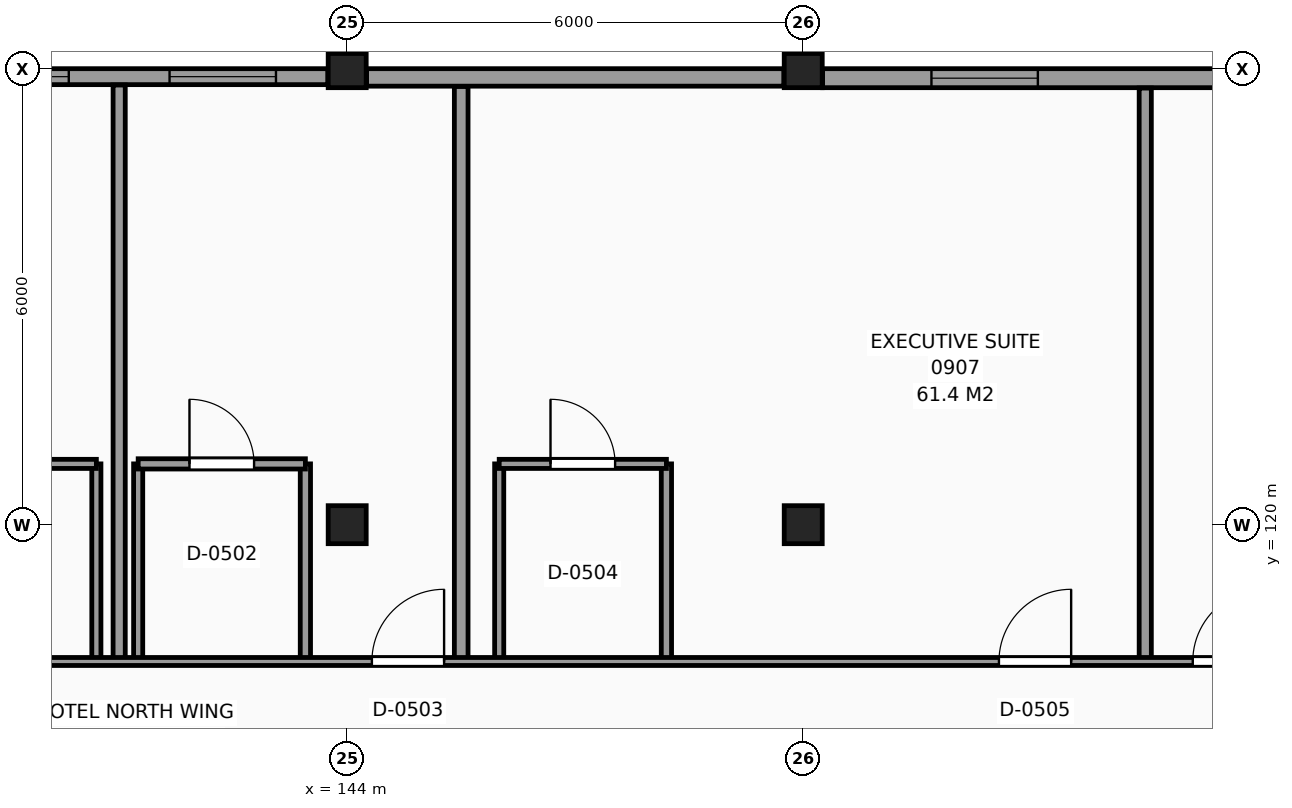
"""IFC4 building model, lengths in metres.
Left out: names, types, materials, properties, quantities, classifications, styles, units other than length and angle.
Written with IfcOpenShell. Run it as: python <this file> out.ifc"""

import sys

from ifc_helpers import new_model, si_unit, direction, frame, frame_2d, origin, origin_2d, place, context, subcontext, project, spatial, rectangle, extrude, element, fill, save


model = new_model("IFC4")
c1 = context("Model", 3, precision=1e-05, world=origin(), true_north=direction((0.0, 1.0)))
c2 = subcontext(c1, "Body", "Model", "MODEL_VIEW")
j1 = project(units=[si_unit("LENGTHUNIT", "METRE"), si_unit("PLANEANGLEUNIT", "RADIAN")], contexts=[c1])
p1 = place(None, origin())
s1 = spatial("IfcSite", under=j1, at=p1, CompositionType="ELEMENT")
p2 = place(p1, origin())
s2 = spatial("IfcBuilding", under=s1, at=p2, CompositionType="ELEMENT")
p3 = place(p2, frame((0.0, 0.0, 38.1)))
s3 = spatial("IfcBuildingStorey", under=s2, at=p3, CompositionType="ELEMENT", Elevation=38.1)
for number, where, z_axis, x_axis in (
    (1, (144.0, 120.0, 0.0), (0.0, 0.0, 1.0), (1.0, 0.0, 0.0)),
    (2, (144.0, 126.0, 0.0), (0.0, 0.0, 1.0), (1.0, 0.0, 0.0)),
    (3, (150.0, 120.0, 0.0), (0.0, 0.0, 1.0), (1.0, 0.0, 0.0)),
    (4, (150.0, 126.0, 0.0), (0.0, 0.0, 1.0), (1.0, 0.0, 0.0)),
):
    element("IfcColumn", number, at=place(p3, frame(where, z_axis=z_axis, x_axis=x_axis)), inside=s3, PredefinedType="COLUMN", context=c2, shape_type="SweptSolid", body=[
        extrude(rectangle(XDim=0.5, YDim=0.5, at=origin_2d()), origin(), (0.0, 0.0, 1.0), 3.3),
    ])
p4 = place(p3, frame((155.745, 125.875, 0.0), z_axis=(0.0, 0.0, 1.0), x_axis=(-1.0, 0.0, 0.0)))
e5 = element("IfcWall", 5, at=p4, inside=s3, PredefinedType="SOLIDWALL", context=c2, shape_type="SweptSolid", body=[
    extrude(rectangle(XDim=5.49, YDim=0.25, at=frame_2d((2.745, 0.0))), origin(), (0.0, 0.0, 1.0), 2.41),
])
p5 = place(p4, frame((2.658, 0.0, 0.8)))
e6 = element("IfcOpeningElement", 6, at=p5, cuts=e5, PredefinedType="OPENING", context=c2, shape_type="SweptSolid", body=[
    extrude(rectangle(XDim=1.4, YDim=1.4, at=frame_2d((0.7, 0.7))), frame((0.0, 0.135, 0.0), z_axis=(0.0, -1.0, 0.0), x_axis=(1.0, 0.0, 0.0)), (0.0, 0.0, 1.0), 0.27),
])
p6 = place(p3, frame((149.745, 125.885, 0.0), z_axis=(0.0, 0.0, 1.0), x_axis=(-1.0, 0.0, 0.0)))
e7 = element("IfcWall", 7, at=p6, inside=s3, PredefinedType="SOLIDWALL", context=c2, shape_type="SweptSolid", body=[
    extrude(rectangle(XDim=5.49, YDim=0.23, at=frame_2d((2.745, 0.0))), origin(), (0.0, 0.0, 1.0), 2.41),
])
p7 = place(p3, frame((143.745, 125.895, 0.0), z_axis=(0.0, 0.0, 1.0), x_axis=(-1.0, 0.0, 0.0)))
e8 = element("IfcWall", 8, at=p7, inside=s3, PredefinedType="SOLIDWALL", context=c2, shape_type="SweptSolid", body=[
    extrude(rectangle(XDim=5.49, YDim=0.21, at=frame_2d((2.745, 0.0))), origin(), (0.0, 0.0, 1.0), 2.41),
])
p8 = place(p7, frame((3.408, 0.0, 0.8)))
e9 = element("IfcOpeningElement", 9, at=p8, cuts=e8, PredefinedType="OPENING", context=c2, shape_type="SweptSolid", body=[
    extrude(rectangle(XDim=1.4, YDim=1.4, at=frame_2d((0.7, 0.7))), frame((0.0, 0.115, 0.0), z_axis=(0.0, -1.0, 0.0), x_axis=(1.0, 0.0, 0.0)), (0.0, 0.0, 1.0), 0.23),
])
p9 = place(p7, frame((0.682, 0.0, 0.8)))
e10 = element("IfcOpeningElement", 10, at=p9, cuts=e8, PredefinedType="OPENING", context=c2, shape_type="SweptSolid", body=[
    extrude(rectangle(XDim=1.4, YDim=1.4, at=frame_2d((0.7, 0.7))), frame((0.0, 0.115, 0.0), z_axis=(0.0, -1.0, 0.0), x_axis=(1.0, 0.0, 0.0)), (0.0, 0.0, 1.0), 0.23),
])
p10 = place(p3, frame((140.7, 118.2, 0.0), z_axis=(0.0, 0.0, 1.0), x_axis=(0.0, 1.0, 0.0)))
e11 = element("IfcWall", 11, at=p10, inside=s3, PredefinedType="PARTITIONING", context=c2, shape_type="SweptSolid", body=[
    extrude(rectangle(XDim=2.6, YDim=0.12, at=frame_2d((1.3, 0.0))), origin(), (0.0, 0.0, 1.0), 3.06),
])
p11 = place(p3, frame((141.0, 118.2, 0.0), z_axis=(0.0, 0.0, 1.0), x_axis=(0.0, 1.0, 0.0)))
e12 = element("IfcWall", 12, at=p11, inside=s3, PredefinedType="PARTITIONING", context=c2, shape_type="SweptSolid", body=[
    extrude(rectangle(XDim=7.585, YDim=0.16, at=frame_2d((3.792, 0.0))), origin(), (0.0, 0.0, 1.0), 3.06),
])
p12 = place(p3, frame((141.25, 118.2, 0.0), z_axis=(0.0, 0.0, 1.0), x_axis=(0.0, 1.0, 0.0)))
e13 = element("IfcWall", 13, at=p12, inside=s3, PredefinedType="PARTITIONING", context=c2, shape_type="SweptSolid", body=[
    extrude(rectangle(XDim=2.6, YDim=0.12, at=frame_2d((1.3, 0.0))), origin(), (0.0, 0.0, 1.0), 3.06),
])
p13 = place(p3, frame((143.45, 118.2, 0.0), z_axis=(0.0, 0.0, 1.0), x_axis=(0.0, 1.0, 0.0)))
e14 = element("IfcWall", 14, at=p13, inside=s3, PredefinedType="PARTITIONING", context=c2, shape_type="SweptSolid", body=[
    extrude(rectangle(XDim=2.6, YDim=0.135, at=frame_2d((1.3, 0.0))), origin(), (0.0, 0.0, 1.0), 3.06),
])
p14 = place(p3, frame((145.5, 118.2, 0.0), z_axis=(0.0, 0.0, 1.0), x_axis=(0.0, 1.0, 0.0)))
e15 = element("IfcWall", 15, at=p14, inside=s3, PredefinedType="PARTITIONING", context=c2, shape_type="SweptSolid", body=[
    extrude(rectangle(XDim=7.565, YDim=0.18, at=frame_2d((3.782, 0.0))), origin(), (0.0, 0.0, 1.0), 3.06),
])
p15 = place(p3, frame((146.0, 118.2, 0.0), z_axis=(0.0, 0.0, 1.0), x_axis=(0.0, 1.0, 0.0)))
e16 = element("IfcWall", 16, at=p15, inside=s3, PredefinedType="PARTITIONING", context=c2, shape_type="SweptSolid", body=[
    extrude(rectangle(XDim=2.6, YDim=0.12, at=frame_2d((1.3, 0.0))), origin(), (0.0, 0.0, 1.0), 3.06),
])
p16 = place(p3, frame((148.2, 118.2, 0.0), z_axis=(0.0, 0.0, 1.0), x_axis=(0.0, 1.0, 0.0)))
e17 = element("IfcWall", 17, at=p16, inside=s3, PredefinedType="PARTITIONING", context=c2, shape_type="SweptSolid", body=[
    extrude(rectangle(XDim=2.6, YDim=0.135, at=frame_2d((1.3, 0.0))), origin(), (0.0, 0.0, 1.0), 3.06),
])
p17 = place(p3, frame((154.5, 118.2, 0.0), z_axis=(0.0, 0.0, 1.0), x_axis=(0.0, 1.0, 0.0)))
e18 = element("IfcWall", 18, at=p17, inside=s3, PredefinedType="PARTITIONING", context=c2, shape_type="SweptSolid", body=[
    extrude(rectangle(XDim=7.545, YDim=0.16, at=frame_2d((3.772, 0.0))), origin(), (0.0, 0.0, 1.0), 3.06),
])
p18 = place(p3, frame((102.215, 118.2, 0.0), z_axis=(0.0, 0.0, 1.0), x_axis=(1.0, 0.0, 0.0)))
e19 = element("IfcWall", 19, at=p18, inside=s3, PredefinedType="PARTITIONING", context=c2, shape_type="SweptSolid", body=[
    extrude(rectangle(XDim=74.285, YDim=0.105, at=frame_2d((37.143, 0.0))), origin(), (0.0, 0.0, 1.0), 3.06),
])
p19 = place(p18, frame((2.36, 0.0, 0.0)))
e20 = element("IfcOpeningElement", 20, at=p19, cuts=e19, PredefinedType="OPENING", context=c2, shape_type="SweptSolid", body=[
    extrude(rectangle(XDim=0.95, YDim=2.1, at=frame_2d((0.475, 1.05))), frame((0.0, 0.062, 0.0), z_axis=(0.0, -1.0, 0.0), x_axis=(1.0, 0.0, 0.0)), (0.0, 0.0, 1.0), 0.125),
])
p20 = place(p18, frame((9.41, 0.0, 0.0)))
e21 = element("IfcOpeningElement", 21, at=p20, cuts=e19, PredefinedType="OPENING", context=c2, shape_type="SweptSolid", body=[
    extrude(rectangle(XDim=0.95, YDim=2.1, at=frame_2d((0.475, 1.05))), frame((0.0, 0.062, 0.0), z_axis=(0.0, -1.0, 0.0), x_axis=(1.0, 0.0, 0.0)), (0.0, 0.0, 1.0), 0.125),
])
p21 = place(p18, frame((18.51, 0.0, 0.0)))
e22 = element("IfcOpeningElement", 22, at=p21, cuts=e19, PredefinedType="OPENING", context=c2, shape_type="SweptSolid", body=[
    extrude(rectangle(XDim=0.95, YDim=2.1, at=frame_2d((0.475, 1.05))), frame((0.0, 0.062, 0.0), z_axis=(0.0, -1.0, 0.0), x_axis=(1.0, 0.0, 0.0)), (0.0, 0.0, 1.0), 0.125),
])
p22 = place(p18, frame((32.36, 0.0, 0.0)))
e23 = element("IfcOpeningElement", 23, at=p22, cuts=e19, PredefinedType="OPENING", context=c2, shape_type="SweptSolid", body=[
    extrude(rectangle(XDim=0.95, YDim=2.1, at=frame_2d((0.475, 1.05))), frame((0.0, 0.062, 0.0), z_axis=(0.0, -1.0, 0.0), x_axis=(1.0, 0.0, 0.0)), (0.0, 0.0, 1.0), 0.125),
])
p23 = place(p18, frame((34.91, 0.0, 0.0)))
e24 = element("IfcOpeningElement", 24, at=p23, cuts=e19, PredefinedType="OPENING", context=c2, shape_type="SweptSolid", body=[
    extrude(rectangle(XDim=0.95, YDim=2.1, at=frame_2d((0.475, 1.05))), frame((0.0, 0.062, 0.0), z_axis=(0.0, -1.0, 0.0), x_axis=(1.0, 0.0, 0.0)), (0.0, 0.0, 1.0), 0.125),
])
p24 = place(p18, frame((42.11, 0.0, 0.0)))
e25 = element("IfcOpeningElement", 25, at=p24, cuts=e19, PredefinedType="OPENING", context=c2, shape_type="SweptSolid", body=[
    extrude(rectangle(XDim=0.95, YDim=2.1, at=frame_2d((0.475, 1.05))), frame((0.0, 0.062, 0.0), z_axis=(0.0, -1.0, 0.0), x_axis=(1.0, 0.0, 0.0)), (0.0, 0.0, 1.0), 0.125),
])
p25 = place(p18, frame((50.36, 0.0, 0.0)))
e26 = element("IfcOpeningElement", 26, at=p25, cuts=e19, PredefinedType="OPENING", context=c2, shape_type="SweptSolid", body=[
    extrude(rectangle(XDim=0.95, YDim=2.1, at=frame_2d((0.475, 1.05))), frame((0.0, 0.062, 0.0), z_axis=(0.0, -1.0, 0.0), x_axis=(1.0, 0.0, 0.0)), (0.0, 0.0, 1.0), 0.125),
])
p26 = place(p18, frame((52.91, 0.0, 0.0)))
e27 = element("IfcOpeningElement", 27, at=p26, cuts=e19, PredefinedType="OPENING", context=c2, shape_type="SweptSolid", body=[
    extrude(rectangle(XDim=0.95, YDim=2.1, at=frame_2d((0.475, 1.05))), frame((0.0, 0.062, 0.0), z_axis=(0.0, -1.0, 0.0), x_axis=(1.0, 0.0, 0.0)), (0.0, 0.0, 1.0), 0.125),
])
p27 = place(p18, frame((60.11, 0.0, 0.0)))
e28 = element("IfcOpeningElement", 28, at=p27, cuts=e19, PredefinedType="OPENING", context=c2, shape_type="SweptSolid", body=[
    extrude(rectangle(XDim=0.95, YDim=2.1, at=frame_2d((0.475, 1.05))), frame((0.0, 0.062, 0.0), z_axis=(0.0, -1.0, 0.0), x_axis=(1.0, 0.0, 0.0)), (0.0, 0.0, 1.0), 0.125),
])
p28 = place(p18, frame((64.31, 0.0, 0.0)))
e29 = element("IfcOpeningElement", 29, at=p28, cuts=e19, PredefinedType="OPENING", context=c2, shape_type="SweptSolid", body=[
    extrude(rectangle(XDim=0.95, YDim=2.1, at=frame_2d((0.475, 1.05))), frame((0.0, 0.062, 0.0), z_axis=(0.0, -1.0, 0.0), x_axis=(1.0, 0.0, 0.0)), (0.0, 0.0, 1.0), 0.125),
])
p29 = place(p18, frame((68.26, 0.0, 0.0)))
e30 = element("IfcOpeningElement", 30, at=p29, cuts=e19, PredefinedType="OPENING", context=c2, shape_type="SweptSolid", body=[
    extrude(rectangle(XDim=0.95, YDim=2.1, at=frame_2d((0.475, 1.05))), frame((0.0, 0.062, 0.0), z_axis=(0.0, -1.0, 0.0), x_axis=(1.0, 0.0, 0.0)), (0.0, 0.0, 1.0), 0.125),
])
p30 = place(p3, frame((138.5, 120.8, 0.0), z_axis=(0.0, 0.0, 1.0), x_axis=(1.0, 0.0, 0.0)))
e31 = element("IfcWall", 31, at=p30, inside=s3, PredefinedType="PARTITIONING", context=c2, shape_type="SweptSolid", body=[
    extrude(rectangle(XDim=2.2, YDim=0.12, at=frame_2d((1.1, 0.0))), origin(), (0.0, 0.0, 1.0), 3.06),
])
p31 = place(p30, frame((0.675, 0.0, 0.0)))
e32 = element("IfcOpeningElement", 32, at=p31, cuts=e31, PredefinedType="OPENING", context=c2, shape_type="SweptSolid", body=[
    extrude(rectangle(XDim=0.85, YDim=2.1, at=frame_2d((0.425, 1.05))), frame((0.0, 0.07, 0.0), z_axis=(0.0, -1.0, 0.0), x_axis=(1.0, 0.0, 0.0)), (0.0, 0.0, 1.0), 0.14),
])
p32 = place(p3, frame((141.25, 120.8, 0.0), z_axis=(0.0, 0.0, 1.0), x_axis=(1.0, 0.0, 0.0)))
e33 = element("IfcWall", 33, at=p32, inside=s3, PredefinedType="PARTITIONING", context=c2, shape_type="SweptSolid", body=[
    extrude(rectangle(XDim=2.2, YDim=0.135, at=frame_2d((1.1, 0.0))), origin(), (0.0, 0.0, 1.0), 3.06),
])
p33 = place(p32, frame((0.675, 0.0, 0.0)))
e34 = element("IfcOpeningElement", 34, at=p33, cuts=e33, PredefinedType="OPENING", context=c2, shape_type="SweptSolid", body=[
    extrude(rectangle(XDim=0.85, YDim=2.1, at=frame_2d((0.425, 1.05))), frame((0.0, 0.078, 0.0), z_axis=(0.0, -1.0, 0.0), x_axis=(1.0, 0.0, 0.0)), (0.0, 0.0, 1.0), 0.155),
])
p34 = place(p3, frame((146.0, 120.8, 0.0), z_axis=(0.0, 0.0, 1.0), x_axis=(1.0, 0.0, 0.0)))
e35 = element("IfcWall", 35, at=p34, inside=s3, PredefinedType="PARTITIONING", context=c2, shape_type="SweptSolid", body=[
    extrude(rectangle(XDim=2.2, YDim=0.12, at=frame_2d((1.1, 0.0))), origin(), (0.0, 0.0, 1.0), 3.06),
])
p35 = place(p34, frame((0.675, 0.0, 0.0)))
e36 = element("IfcOpeningElement", 36, at=p35, cuts=e35, PredefinedType="OPENING", context=c2, shape_type="SweptSolid", body=[
    extrude(rectangle(XDim=0.85, YDim=2.1, at=frame_2d((0.425, 1.05))), frame((0.0, 0.07, 0.0), z_axis=(0.0, -1.0, 0.0), x_axis=(1.0, 0.0, 0.0)), (0.0, 0.0, 1.0), 0.14),
])
p36 = place(p8, origin())
e37 = element("IfcWindow", 37, at=p36, inside=s3, PartitioningType="SINGLE_PANEL", PredefinedType="WINDOW", context=c2, shape_type="SweptSolid", body=[
    extrude(rectangle(XDim=1.4, YDim=1.4, at=frame_2d((0.7, 0.7))), frame((0.0, 0.03, 0.0), z_axis=(0.0, -1.0, 0.0), x_axis=(1.0, 0.0, 0.0)), (0.0, 0.0, 1.0), 0.06),
])
fill(e9, e37)
p37 = place(p9, origin())
e38 = element("IfcWindow", 38, at=p37, inside=s3, PartitioningType="SINGLE_PANEL", PredefinedType="WINDOW", context=c2, shape_type="SweptSolid", body=[
    extrude(rectangle(XDim=1.4, YDim=1.4, at=frame_2d((0.7, 0.7))), frame((0.0, 0.03, 0.0), z_axis=(0.0, -1.0, 0.0), x_axis=(1.0, 0.0, 0.0)), (0.0, 0.0, 1.0), 0.06),
])
fill(e10, e38)
p38 = place(p5, origin())
e39 = element("IfcWindow", 39, at=p38, inside=s3, PartitioningType="SINGLE_PANEL", PredefinedType="WINDOW", context=c2, shape_type="SweptSolid", body=[
    extrude(rectangle(XDim=1.4, YDim=1.4, at=frame_2d((0.7, 0.7))), frame((0.0, 0.03, 0.0), z_axis=(0.0, -1.0, 0.0), x_axis=(1.0, 0.0, 0.0)), (0.0, 0.0, 1.0), 0.06),
])
fill(e6, e39)
p39 = place(p33, origin())
e40 = element("IfcDoor", 40, at=p39, inside=s3, OperationType="SINGLE_SWING_LEFT", PredefinedType="DOOR", context=c2, shape_type="SweptSolid", body=[
    extrude(rectangle(XDim=0.85, YDim=2.1, at=frame_2d((0.425, 1.05))), frame((0.0, 0.025, 0.0), z_axis=(0.0, -1.0, 0.0), x_axis=(1.0, 0.0, 0.0)), (0.0, 0.0, 1.0), 0.05),
])
fill(e34, e40)
p40 = place(p24, origin())
e41 = element("IfcDoor", 41, at=p40, inside=s3, OperationType="SINGLE_SWING_RIGHT", PredefinedType="DOOR", context=c2, shape_type="SweptSolid", body=[
    extrude(rectangle(XDim=0.95, YDim=2.1, at=frame_2d((0.475, 1.05))), frame((0.0, 0.025, 0.0), z_axis=(0.0, -1.0, 0.0), x_axis=(1.0, 0.0, 0.0)), (0.0, 0.0, 1.0), 0.05),
])
fill(e25, e41)
p41 = place(p35, origin())
e42 = element("IfcDoor", 42, at=p41, inside=s3, OperationType="SINGLE_SWING_LEFT", PredefinedType="DOOR", context=c2, shape_type="SweptSolid", body=[
    extrude(rectangle(XDim=0.85, YDim=2.1, at=frame_2d((0.425, 1.05))), frame((0.0, 0.025, 0.0), z_axis=(0.0, -1.0, 0.0), x_axis=(1.0, 0.0, 0.0)), (0.0, 0.0, 1.0), 0.05),
])
fill(e36, e42)
p42 = place(p25, origin())
e43 = element("IfcDoor", 43, at=p42, inside=s3, OperationType="SINGLE_SWING_RIGHT", PredefinedType="DOOR", context=c2, shape_type="SweptSolid", body=[
    extrude(rectangle(XDim=0.95, YDim=2.1, at=frame_2d((0.475, 1.05))), frame((0.0, 0.025, 0.0), z_axis=(0.0, -1.0, 0.0), x_axis=(1.0, 0.0, 0.0)), (0.0, 0.0, 1.0), 0.05),
])
fill(e26, e43)
p43 = place(p26, origin())
e44 = element("IfcDoor", 44, at=p43, inside=s3, OperationType="SINGLE_SWING_RIGHT", PredefinedType="DOOR", context=c2, shape_type="SweptSolid", body=[
    extrude(rectangle(XDim=0.95, YDim=2.1, at=frame_2d((0.475, 1.05))), frame((0.0, 0.025, 0.0), z_axis=(0.0, -1.0, 0.0), x_axis=(1.0, 0.0, 0.0)), (0.0, 0.0, 1.0), 0.05),
])
fill(e27, e44)
save(model, sys.argv[1])
